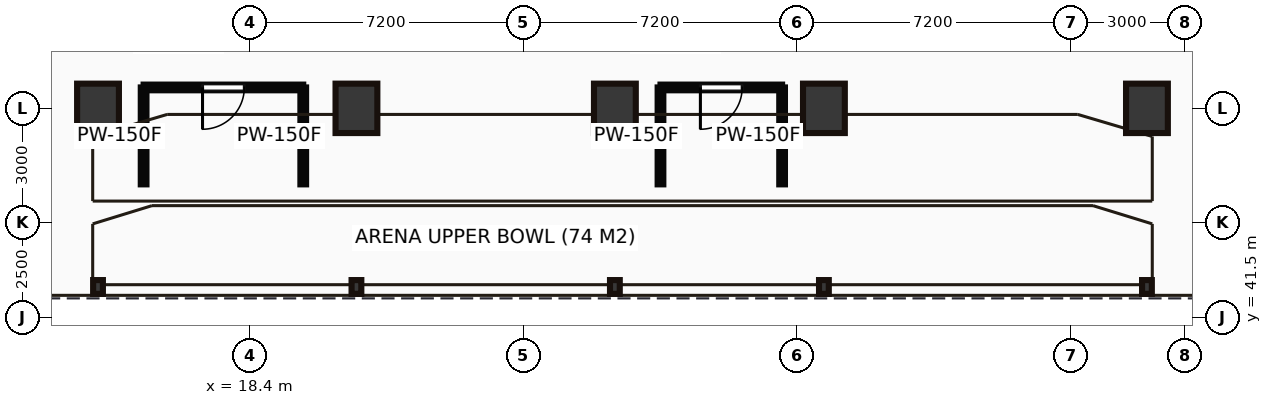
"""IFC4 building model, lengths in metres.
Left out: names, types, materials, properties, quantities, classifications, styles, units other than length and angle.
Written with IfcOpenShell. Run it as: python <this file> out.ifc"""

import sys

from ifc_helpers import new_model, si_unit, direction, frame, frame_2d, origin, origin_2d, place, context, subcontext, project, spatial, rectangle, hollow_rectangle, i_section, extrude, source, transform, mapped, element, fill, save


model = new_model("IFC4")
c1 = context("Model", 3, precision=1e-05, world=origin(), true_north=direction((0.0, 1.0)))
c2 = subcontext(c1, "Body", "Model", "MODEL_VIEW")
j1 = project(units=[si_unit("LENGTHUNIT", "METRE"), si_unit("PLANEANGLEUNIT", "RADIAN")], contexts=[c1])
p1 = place(None, origin())
s1 = spatial("IfcSite", under=j1, at=p1, CompositionType="ELEMENT")
p2 = place(p1, origin())
s2 = spatial("IfcBuilding", under=s1, at=p2, CompositionType="ELEMENT")
p3 = place(p2, frame((0.0, 0.0, 16.0)))
s3 = spatial("IfcBuildingStorey", under=s2, at=p3, CompositionType="ELEMENT", Elevation=16.0)
m1 = source(origin(), c2, "Body", "SweptSolid", [
    extrude(hollow_rectangle(XDim=1.1, YDim=1.3, WallThickness=0.055, at=origin_2d()), origin(), (0.0, 0.0, 1.0), 5.0),
])
for number, where, z_axis, x_axis in (
    (1, (14.4, 47.0, 0.0), (0.0, 0.0, 1.0), (1.0, 0.0, 0.0)),
    (2, (21.2, 47.0, 0.0), (0.0, 0.0, 1.0), (1.0, 0.0, 0.0)),
    (3, (28.0, 47.0, 0.0), (0.0, 0.0, 1.0), (1.0, 0.0, 0.0)),
    (4, (33.5, 47.0, 0.0), (0.0, 0.0, 1.0), (1.0, 0.0, 0.0)),
    (5, (42.0, 47.0, 0.0), (0.0, 0.0, 1.0), (1.0, 0.0, 0.0)),
):
    element("IfcColumn", number, at=place(p3, frame(where, z_axis=z_axis, x_axis=x_axis)), inside=s3, PredefinedType="PILASTER", context=c2, shape_type="MappedRepresentation", body=[
        mapped(m1, transform((0.0, 0.0, 0.0))),
    ])
m2 = source(origin(), c2, "Body", "SweptSolid", [
    extrude(i_section(OverallWidth=0.257, OverallDepth=0.363, WebThickness=0.013, FlangeThickness=0.022, at=origin_2d()), origin(), (0.0, 0.0, 1.0), 2.15),
])
for number, where, z_axis, x_axis in (
    (6, (14.4, 42.3, 0.0), (0.0, 0.0, 1.0), (1.0, 0.0, 0.0)),
    (7, (21.2, 42.3, 0.0), (0.0, 0.0, 1.0), (1.0, 0.0, 0.0)),
    (8, (28.0, 42.3, 0.0), (0.0, 0.0, 1.0), (1.0, 0.0, 0.0)),
    (9, (33.5, 42.3, 0.0), (0.0, 0.0, 1.0), (1.0, 0.0, 0.0)),
    (10, (42.0, 42.3, 0.0), (0.0, 0.0, 1.0), (1.0, 0.0, 0.0)),
):
    element("IfcColumn", number, at=place(p3, frame(where, z_axis=z_axis, x_axis=x_axis)), inside=s3, PredefinedType="COLUMN", context=c2, shape_type="MappedRepresentation", body=[
        mapped(m2, transform((0.0, 0.0, 0.0))),
    ])
m3 = source(origin(), c2, "Body", "SweptSolid", [
    extrude(rectangle(XDim=2.55, YDim=0.15, at=frame_2d((1.275, 0.0))), origin(), (0.0, 0.0, 1.0), 4.7),
])
for number, where, z_axis, x_axis in (
    (11, (15.6, 45.0, 0.0), (0.0, 0.0, 1.0), (0.0, 1.0, 0.0)),
    (12, (19.8, 45.0, 0.0), (0.0, 0.0, 1.0), (0.0, 1.0, 0.0)),
):
    element("IfcWall", number, at=place(p3, frame(where, z_axis=z_axis, x_axis=x_axis)), inside=s3, PredefinedType="PARTITIONING", context=c2, shape_type="MappedRepresentation", body=[
        mapped(m3, transform((0.0, 0.0, 0.0))),
    ])
m4 = source(origin(), c2, "Body", "SweptSolid", [
    extrude(rectangle(XDim=4.2, YDim=0.15, at=frame_2d((2.1, 0.0))), origin(), (0.0, 0.0, 1.0), 4.7),
])
p4 = place(p3, frame((15.6, 47.55, 0.0), z_axis=(0.0, 0.0, 1.0), x_axis=(1.0, 0.0, 0.0)))
e13 = element("IfcWall", 13, at=p4, inside=s3, PredefinedType="PARTITIONING", context=c2, shape_type="MappedRepresentation", body=[
    mapped(m4, transform((0.0, 0.0, 0.0))),
])
p5 = place(p4, frame((1.55, 0.0, 0.0)))
e14 = element("IfcOpeningElement", 14, at=p5, cuts=e13, PredefinedType="OPENING", context=c2, shape_type="SweptSolid", body=[
    extrude(rectangle(XDim=1.1, YDim=2.15, at=frame_2d((0.55, 1.075))), frame((0.0, 0.085, 0.0), z_axis=(0.0, -1.0, 0.0), x_axis=(1.0, 0.0, 0.0)), (0.0, 0.0, 1.0), 0.17),
])
for number, where, z_axis, x_axis in (
    (15, (29.2, 45.0, 0.0), (0.0, 0.0, 1.0), (0.0, 1.0, 0.0)),
    (16, (32.4, 45.0, 0.0), (0.0, 0.0, 1.0), (0.0, 1.0, 0.0)),
):
    element("IfcWall", number, at=place(p3, frame(where, z_axis=z_axis, x_axis=x_axis)), inside=s3, PredefinedType="PARTITIONING", context=c2, shape_type="MappedRepresentation", body=[
        mapped(m3, transform((0.0, 0.0, 0.0))),
    ])
m5 = source(origin(), c2, "Body", "SweptSolid", [
    extrude(rectangle(XDim=3.2, YDim=0.15, at=frame_2d((1.6, 0.0))), origin(), (0.0, 0.0, 1.0), 4.7),
])
p6 = place(p3, frame((29.2, 47.55, 0.0), z_axis=(0.0, 0.0, 1.0), x_axis=(1.0, 0.0, 0.0)))
e17 = element("IfcWall", 17, at=p6, inside=s3, PredefinedType="PARTITIONING", context=c2, shape_type="MappedRepresentation", body=[
    mapped(m5, transform((0.0, 0.0, 0.0))),
])
p7 = place(p6, frame((1.05, 0.0, 0.0)))
e18 = element("IfcOpeningElement", 18, at=p7, cuts=e17, PredefinedType="OPENING", context=c2, shape_type="SweptSolid", body=[
    extrude(rectangle(XDim=1.1, YDim=2.15, at=frame_2d((0.55, 1.075))), frame((0.0, 0.085, 0.0), z_axis=(0.0, -1.0, 0.0), x_axis=(1.0, 0.0, 0.0)), (0.0, 0.0, 1.0), 0.17),
])
m6 = source(origin(), c2, "Body", "SweptSolid", [
    extrude(rectangle(XDim=1.1, YDim=2.15, at=frame_2d((0.55, 1.075))), frame((0.0, 0.025, 0.0), z_axis=(0.0, -1.0, 0.0), x_axis=(1.0, 0.0, 0.0)), (0.0, 0.0, 1.0), 0.05),
])
p8 = place(p5, frame((1.1, 0.0, 0.0), z_axis=(0.0, 0.0, 1.0), x_axis=(-1.0, 0.0, 0.0)))
e19 = element("IfcDoor", 19, at=p8, inside=s3, OperationType="SINGLE_SWING_LEFT", PredefinedType="DOOR", context=c2, shape_type="MappedRepresentation", body=[
    mapped(m6, transform((0.0, 0.0, 0.0))),
])
fill(e14, e19)
p9 = place(p7, frame((1.1, 0.0, 0.0), z_axis=(0.0, 0.0, 1.0), x_axis=(-1.0, 0.0, 0.0)))
e20 = element("IfcDoor", 20, at=p9, inside=s3, OperationType="SINGLE_SWING_LEFT", PredefinedType="DOOR", context=c2, shape_type="MappedRepresentation", body=[
    mapped(m6, transform((0.0, 0.0, 0.0))),
])
fill(e18, e20)
save(model, sys.argv[1])
